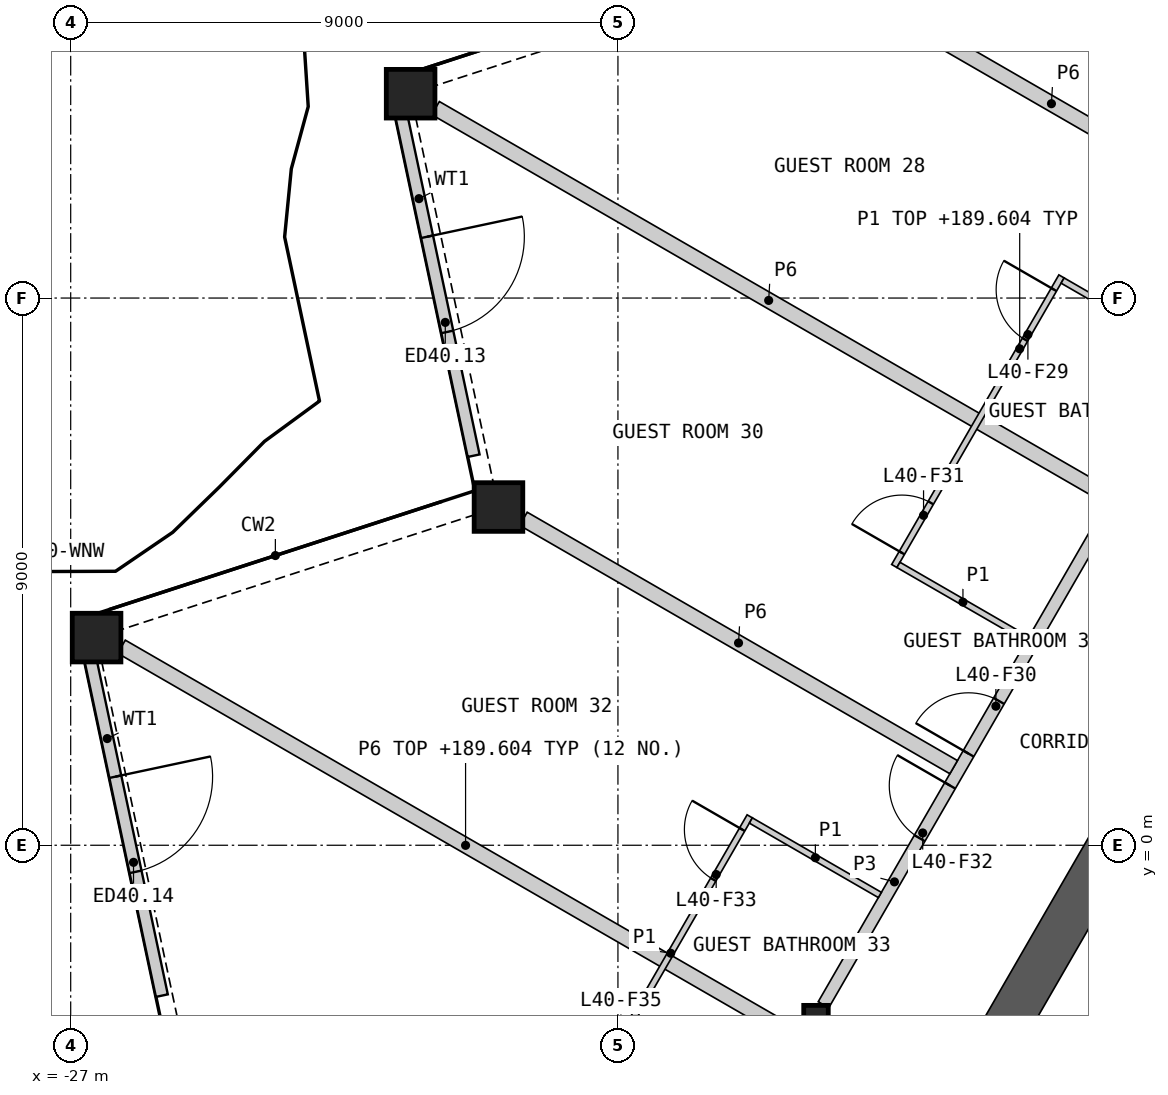
"""IFC4 building model, lengths in metres.
Left out: names, types, materials, properties, quantities, classifications, styles, units other than length and angle.
Written with IfcOpenShell. Run it as: python <this file> out.ifc"""

import sys

from ifc_helpers import new_model, si_unit, direction, frame, frame_2d, origin, origin_2d, place, context, subcontext, project, spatial, polyline, rectangle, hollow_rectangle, i_section, outline, extrude, element, fill, save


model = new_model("IFC4")
c1 = context("Model", 3, precision=1e-05, world=origin(), true_north=direction((0.0, 1.0)))
c2 = subcontext(c1, "Body", "Model", "MODEL_VIEW")
j1 = project(units=[si_unit("LENGTHUNIT", "METRE"), si_unit("PLANEANGLEUNIT", "RADIAN")], contexts=[c1])
p1 = place(None, origin())
s1 = spatial("IfcSite", under=j1, at=p1, CompositionType="ELEMENT")
p2 = place(p1, origin())
s2 = spatial("IfcBuilding", under=s1, at=p2, CompositionType="ELEMENT")
p3 = place(p2, frame((0.0, 0.0, 187.2)))
s3 = spatial("IfcBuildingStorey", under=s2, at=p3, CompositionType="ELEMENT", Elevation=187.2)
for number, where, z_axis, x_axis in (
    (1, (-21.409, 12.361, 0.0), (0.0, 0.0, 1.0), (1.0, 0.0, 0.0)),
    (2, (-19.965, 5.563, 0.0), (0.0, 0.0, 1.0), (1.0, 0.0, 0.0)),
    (3, (-26.574, 3.415, 0.0), (0.0, 0.0, 1.0), (1.0, 0.0, 0.0)),
):
    element("IfcColumn", number, at=place(p3, frame(where, z_axis=z_axis, x_axis=x_axis)), inside=s3, PredefinedType="COLUMN", context=c2, shape_type="SweptSolid", body=[
        extrude(hollow_rectangle(XDim=0.8, YDim=0.8, WallThickness=0.05, at=origin_2d()), origin(), (0.0, 0.0, 1.0), 3.6),
    ])
p4 = place(p3, frame((-14.743, -2.837, 0.0), z_axis=(0.0, 0.0, 1.0), x_axis=(1.0, 0.0, 0.0)))
e4 = element("IfcColumn", 4, at=p4, inside=s3, PredefinedType="COLUMN", context=c2, shape_type="SweptSolid", body=[
    extrude(i_section(OverallWidth=0.404, OverallDepth=0.407, WebThickness=0.027, FlangeThickness=0.044, at=origin_2d()), origin(), (0.0, 0.0, 1.0), 3.6),
])
p5 = place(p3, frame((-21.572, 12.044, 0.0), z_axis=(0.0, 0.0, 1.0), x_axis=(0.207914487103, -0.978147006361, 0.0)))
e5 = element("IfcWall", 5, at=p5, inside=s3, PredefinedType="SOLIDWALL", context=c2, shape_type="SweptSolid", body=[
    extrude(rectangle(XDim=5.763, YDim=0.2, at=frame_2d((2.882, 0.0))), origin(), (0.0, 0.0, 1.0), 2.701),
])
p6 = place(p5, frame((2.082, 0.0, 0.0)))
e6 = element("IfcOpeningElement", 6, at=p6, cuts=e5, PredefinedType="OPENING", context=c2, shape_type="SweptSolid", body=[
    extrude(rectangle(XDim=1.6, YDim=2.4, at=frame_2d((0.8, 1.2))), frame((0.0, 0.11, 0.0), z_axis=(0.0, -1.0, 0.0), x_axis=(1.0, 0.0, 0.0)), (0.0, 0.0, 1.0), 0.22),
])
p7 = place(p3, frame((-26.699, 3.164, 0.0), z_axis=(0.0, 0.0, 1.0), x_axis=(0.207914487103, -0.978147006361, 0.0)))
e7 = element("IfcWall", 7, at=p7, inside=s3, PredefinedType="SOLIDWALL", context=c2, shape_type="SweptSolid", body=[
    extrude(rectangle(XDim=5.763, YDim=0.2, at=frame_2d((2.882, 0.0))), origin(), (0.0, 0.0, 1.0), 2.701),
])
p8 = place(p7, frame((2.082, 0.0, 0.0)))
e8 = element("IfcOpeningElement", 8, at=p8, cuts=e7, PredefinedType="OPENING", context=c2, shape_type="SweptSolid", body=[
    extrude(rectangle(XDim=1.6, YDim=2.4, at=frame_2d((0.8, 1.2))), frame((0.0, 0.11, 0.0), z_axis=(0.0, -1.0, 0.0), x_axis=(1.0, 0.0, 0.0)), (0.0, 0.0, 1.0), 0.22),
])
p9 = place(p3, origin())
e9 = element("IfcWall", 9, at=p9, inside=s3, PredefinedType="SHEAR", context=c2, shape_type="SweptSolid", body=[
    extrude(outline(polyline([(-5.307, -1.281), (-10.374, -4.206), (-10.032, -4.298), (-5.182, -1.498), (-5.307, -1.281)])), origin(), (0.0, 0.0, 1.0), 3.25),
])
p10 = place(p3, frame((-9.625, 0.477, 0.0), z_axis=(0.0, 0.0, 1.0), x_axis=(-0.499986234705, -0.866033351035, 0.0)))
e10 = element("IfcWall", 10, at=p10, inside=s3, PredefinedType="SHEAR", context=c2, shape_type="SweptSolid", body=[
    extrude(rectangle(XDim=9.801, YDim=0.75, at=frame_2d((4.9, 0.0))), origin(), (0.0, 0.0, 1.0), 3.25),
])
p11 = place(p3, frame((-26.164, 3.265, 0.0), z_axis=(0.0, 0.0, 1.0), x_axis=(0.866021313335, -0.500007084799, 0.0)))
e11 = element("IfcWall", 11, at=p11, inside=s3, PredefinedType="PARTITIONING", context=c2, shape_type="SweptSolid", body=[
    extrude(rectangle(XDim=13.068, YDim=0.25, at=frame_2d((6.534, 0.0))), origin(), (0.0, 0.0, 1.0), 2.404),
])
p12 = place(p3, frame((-21.0, 12.124, 0.0), z_axis=(0.0, 0.0, 1.0), x_axis=(0.866025883649, -0.499999168849, 0.0)))
e12 = element("IfcWall", 12, at=p12, inside=s3, PredefinedType="PARTITIONING", context=c2, shape_type="SweptSolid", body=[
    extrude(rectangle(XDim=12.652, YDim=0.25, at=frame_2d((6.326, 0.0))), origin(), (0.0, 0.0, 1.0), 2.404),
])
p13 = place(p3, frame((-14.619, -2.624, 0.0), z_axis=(0.0, 0.0, 1.0), x_axis=(0.50000393355, 0.866023132736, 0.0)))
e13 = element("IfcWall", 13, at=p13, inside=s3, PredefinedType="PARTITIONING", context=c2, shape_type="SweptSolid", body=[
    extrude(rectangle(XDim=9.335, YDim=0.2, at=frame_2d((4.667, 0.0))), origin(), (0.0, 0.0, 1.0), 3.25),
])
p14 = place(p13, frame((4.77, 0.0, 0.0)))
e14 = element("IfcOpeningElement", 14, at=p14, cuts=e13, PredefinedType="OPENING", context=c2, shape_type="SweptSolid", body=[
    extrude(rectangle(XDim=1.0, YDim=2.1, at=frame_2d((0.5, 1.05))), frame((0.0, 0.11, 0.0), z_axis=(0.0, -1.0, 0.0), x_axis=(1.0, 0.0, 0.0)), (0.0, 0.0, 1.0), 0.22),
])
p15 = place(p13, frame((3.163, 0.0, 0.0)))
e15 = element("IfcOpeningElement", 15, at=p15, cuts=e13, PredefinedType="OPENING", context=c2, shape_type="SweptSolid", body=[
    extrude(rectangle(XDim=1.0, YDim=2.1, at=frame_2d((0.5, 1.05))), frame((0.0, 0.11, 0.0), z_axis=(0.0, -1.0, 0.0), x_axis=(1.0, 0.0, 0.0)), (0.0, 0.0, 1.0), 0.22),
])
p16 = place(p3, frame((-19.555, 5.37, 0.0), z_axis=(0.0, 0.0, 1.0), x_axis=(0.866024371346, -0.500001788232, 0.0)))
e16 = element("IfcWall", 16, at=p16, inside=s3, PredefinedType="PARTITIONING", context=c2, shape_type="SweptSolid", body=[
    extrude(rectangle(XDim=8.171, YDim=0.25, at=frame_2d((4.085, 0.0))), origin(), (0.0, 0.0, 1.0), 2.404),
])
p17 = place(p3, frame((-14.39, 14.228, 0.0), z_axis=(0.0, 0.0, 1.0), x_axis=(0.866031008936, -0.499990291468, 0.0)))
e17 = element("IfcWall", 17, at=p17, inside=s3, PredefinedType="PARTITIONING", context=c2, shape_type="SweptSolid", body=[
    extrude(rectangle(XDim=8.127, YDim=0.25, at=frame_2d((4.063, 0.0))), origin(), (0.0, 0.0, 1.0), 2.404),
])
p18 = place(p3, frame((-13.455, 4.593, 0.0), z_axis=(0.0, 0.0, 1.0), x_axis=(0.500015767406, 0.866016300277, 0.0)))
e18 = element("IfcWall", 18, at=p18, inside=s3, PredefinedType="PARTITIONING", context=c2, shape_type="SweptSolid", body=[
    extrude(rectangle(XDim=5.5, YDim=0.1, at=frame_2d((2.75, 0.0))), origin(), (0.0, 0.0, 1.0), 2.404),
])
p19 = place(p18, frame((4.3, 0.0, 0.0)))
e19 = element("IfcOpeningElement", 19, at=p19, cuts=e18, PredefinedType="OPENING", context=c2, shape_type="SweptSolid", body=[
    extrude(rectangle(XDim=0.95, YDim=2.1, at=frame_2d((0.475, 1.05))), frame((0.0, 0.06, 0.0), z_axis=(0.0, -1.0, 0.0), x_axis=(1.0, 0.0, 0.0)), (0.0, 0.0, 1.0), 0.12),
])
p20 = place(p18, frame((0.25, 0.0, 0.0)))
e20 = element("IfcOpeningElement", 20, at=p20, cuts=e18, PredefinedType="OPENING", context=c2, shape_type="SweptSolid", body=[
    extrude(rectangle(XDim=0.95, YDim=2.1, at=frame_2d((0.475, 1.05))), frame((0.0, 0.06, 0.0), z_axis=(0.0, -1.0, 0.0), x_axis=(1.0, 0.0, 0.0)), (0.0, 0.0, 1.0), 0.12),
])
p21 = place(p3, frame((-18.432, -4.028, 0.0), z_axis=(0.0, 0.0, 1.0), x_axis=(0.499992051641, 0.866029992723, 0.0)))
e21 = element("IfcWall", 21, at=p21, inside=s3, PredefinedType="PARTITIONING", context=c2, shape_type="SweptSolid", body=[
    extrude(rectangle(XDim=5.2, YDim=0.1, at=frame_2d((2.6, 0.0))), origin(), (0.0, 0.0, 1.0), 2.404),
])
p22 = place(p21, frame((4.0, 0.0, 0.0)))
e22 = element("IfcOpeningElement", 22, at=p22, cuts=e21, PredefinedType="OPENING", context=c2, shape_type="SweptSolid", body=[
    extrude(rectangle(XDim=0.95, YDim=2.1, at=frame_2d((0.475, 1.05))), frame((0.0, 0.06, 0.0), z_axis=(0.0, -1.0, 0.0), x_axis=(1.0, 0.0, 0.0)), (0.0, 0.0, 1.0), 0.12),
])
p23 = place(p21, frame((0.25, 0.0, 0.0)))
e23 = element("IfcOpeningElement", 23, at=p23, cuts=e21, PredefinedType="OPENING", context=c2, shape_type="SweptSolid", body=[
    extrude(rectangle(XDim=0.95, YDim=2.1, at=frame_2d((0.475, 1.05))), frame((0.0, 0.06, 0.0), z_axis=(0.0, -1.0, 0.0), x_axis=(1.0, 0.0, 0.0)), (0.0, 0.0, 1.0), 0.12),
])
p24 = place(p3, frame((-13.387, 4.611, 0.0), z_axis=(0.0, 0.0, 1.0), x_axis=(0.866032905446, -0.499987006516, 0.0)))
e24 = element("IfcWall", 24, at=p24, inside=s3, PredefinedType="PARTITIONING", context=c2, shape_type="SweptSolid", body=[
    extrude(rectangle(XDim=2.45, YDim=0.1, at=frame_2d((1.225, 0.0))), origin(), (0.0, 0.0, 1.0), 2.404),
])
p25 = place(p3, frame((-15.814, 0.407, 0.0), z_axis=(0.0, 0.0, 1.0), x_axis=(0.866057815567, -0.499943856944, 0.0)))
e25 = element("IfcWall", 25, at=p25, inside=s3, PredefinedType="PARTITIONING", context=c2, shape_type="SweptSolid", body=[
    extrude(rectangle(XDim=2.45, YDim=0.1, at=frame_2d((1.225, 0.0))), origin(), (0.0, 0.0, 1.0), 2.404),
])
p26 = place(p3, frame((-10.687, 9.288, 0.0), z_axis=(0.0, 0.0, 1.0), x_axis=(0.866032905446, -0.499987006516, 0.0)))
e26 = element("IfcWall", 26, at=p26, inside=s3, PredefinedType="PARTITIONING", context=c2, shape_type="SweptSolid", body=[
    extrude(rectangle(XDim=2.45, YDim=0.1, at=frame_2d((1.225, 0.0))), origin(), (0.0, 0.0, 1.0), 2.404),
])
p27 = place(p6, origin())
e27 = element("IfcDoor", 27, at=p27, inside=s3, OperationType="DOUBLE_DOOR_SINGLE_SWING", PredefinedType="DOOR", context=c2, shape_type="SweptSolid", body=[
    extrude(rectangle(XDim=1.6, YDim=2.4, at=frame_2d((0.8, 1.2))), frame((0.0, 0.025, 0.0), z_axis=(0.0, -1.0, 0.0), x_axis=(1.0, 0.0, 0.0)), (0.0, 0.0, 1.0), 0.05),
])
fill(e6, e27)
p28 = place(p8, origin())
e28 = element("IfcDoor", 28, at=p28, inside=s3, OperationType="DOUBLE_DOOR_SINGLE_SWING", PredefinedType="DOOR", context=c2, shape_type="SweptSolid", body=[
    extrude(rectangle(XDim=1.6, YDim=2.4, at=frame_2d((0.8, 1.2))), frame((0.0, 0.025, 0.0), z_axis=(0.0, -1.0, 0.0), x_axis=(1.0, 0.0, 0.0)), (0.0, 0.0, 1.0), 0.05),
])
fill(e8, e28)
p29 = place(p19, origin())
e29 = element("IfcDoor", 29, at=p29, inside=s3, OperationType="SINGLE_SWING_RIGHT", PredefinedType="DOOR", context=c2, shape_type="SweptSolid", body=[
    extrude(rectangle(XDim=0.95, YDim=2.1, at=frame_2d((0.475, 1.05))), frame((0.0, 0.025, 0.0), z_axis=(0.0, -1.0, 0.0), x_axis=(1.0, 0.0, 0.0)), (0.0, 0.0, 1.0), 0.05),
])
fill(e19, e29)
p30 = place(p14, origin())
e30 = element("IfcDoor", 30, at=p30, inside=s3, OperationType="SINGLE_SWING_LEFT", PredefinedType="DOOR", context=c2, shape_type="SweptSolid", body=[
    extrude(rectangle(XDim=1.0, YDim=2.1, at=frame_2d((0.5, 1.05))), frame((0.0, 0.025, 0.0), z_axis=(0.0, -1.0, 0.0), x_axis=(1.0, 0.0, 0.0)), (0.0, 0.0, 1.0), 0.05),
])
fill(e14, e30)
p31 = place(p20, origin())
e31 = element("IfcDoor", 31, at=p31, inside=s3, OperationType="SINGLE_SWING_LEFT", PredefinedType="DOOR", context=c2, shape_type="SweptSolid", body=[
    extrude(rectangle(XDim=0.95, YDim=2.1, at=frame_2d((0.475, 1.05))), frame((0.0, 0.025, 0.0), z_axis=(0.0, -1.0, 0.0), x_axis=(1.0, 0.0, 0.0)), (0.0, 0.0, 1.0), 0.05),
])
fill(e20, e31)
p32 = place(p15, origin())
e32 = element("IfcDoor", 32, at=p32, inside=s3, OperationType="SINGLE_SWING_RIGHT", PredefinedType="DOOR", context=c2, shape_type="SweptSolid", body=[
    extrude(rectangle(XDim=1.0, YDim=2.1, at=frame_2d((0.5, 1.05))), frame((0.0, 0.025, 0.0), z_axis=(0.0, -1.0, 0.0), x_axis=(1.0, 0.0, 0.0)), (0.0, 0.0, 1.0), 0.05),
])
fill(e15, e32)
p33 = place(p22, origin())
e33 = element("IfcDoor", 33, at=p33, inside=s3, OperationType="SINGLE_SWING_RIGHT", PredefinedType="DOOR", context=c2, shape_type="SweptSolid", body=[
    extrude(rectangle(XDim=0.95, YDim=2.1, at=frame_2d((0.475, 1.05))), frame((0.0, 0.025, 0.0), z_axis=(0.0, -1.0, 0.0), x_axis=(1.0, 0.0, 0.0)), (0.0, 0.0, 1.0), 0.05),
])
fill(e22, e33)
save(model, sys.argv[1])
